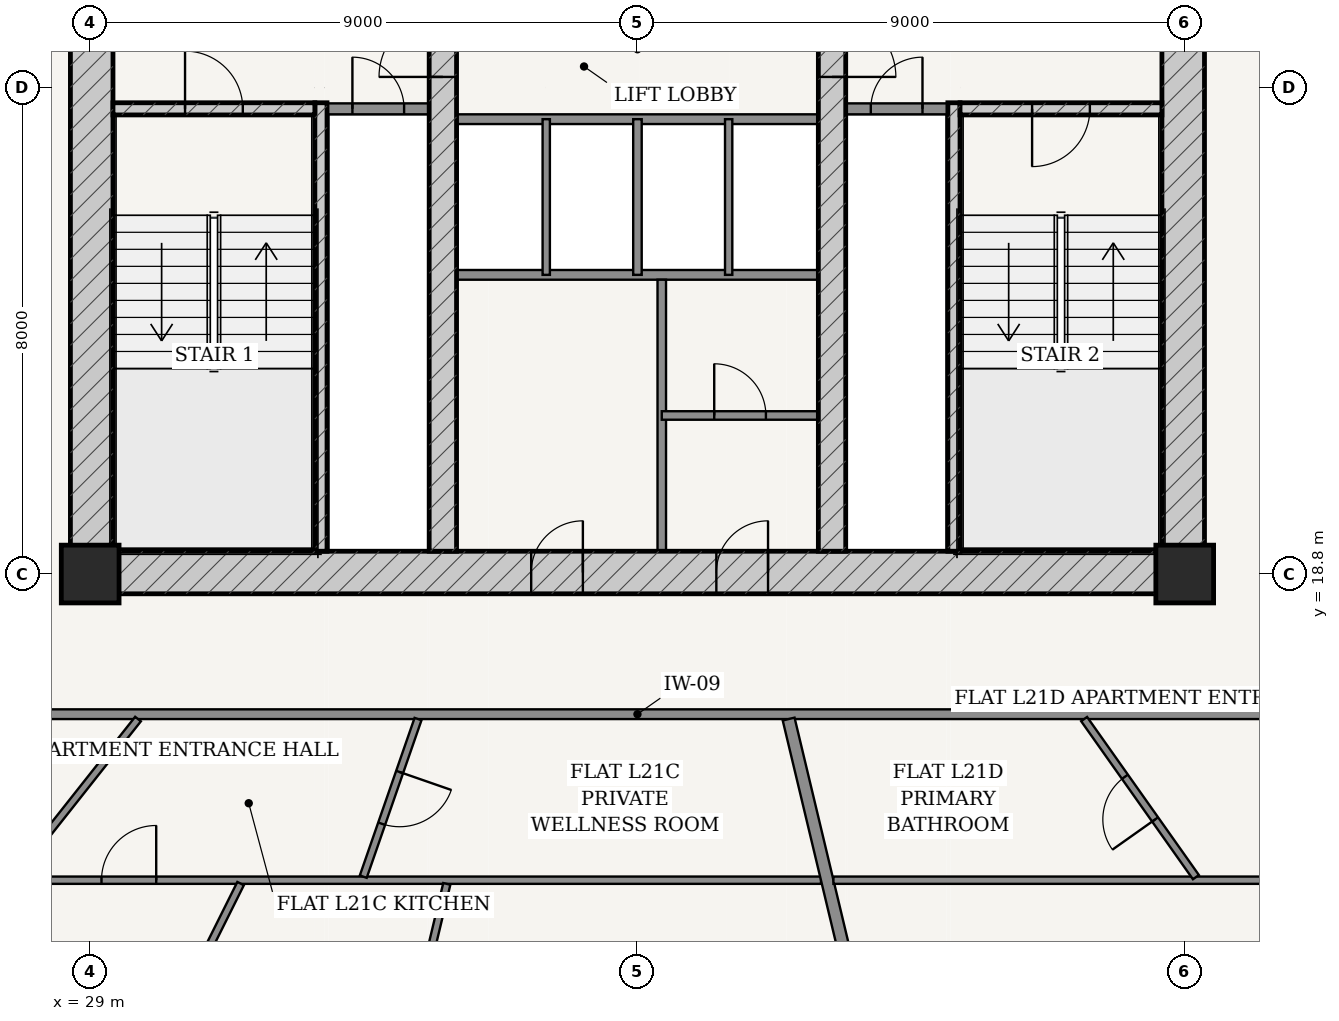
"""IFC4 building model, lengths in metres.
Left out: names, types, materials, properties, quantities, classifications, styles, units other than length and angle.
Written with IfcOpenShell. Run it as: python <this file> out.ifc"""

import sys

from ifc_helpers import new_model, si_unit, direction, frame, frame_2d, origin, origin_2d, place, context, subcontext, project, spatial, rectangle, extrude, source, transform, mapped, element, fill, save


model = new_model("IFC4")
c1 = context("Model", 3, precision=1e-05, world=origin(), true_north=direction((-0.2419218956, 0.970295726276)))
c2 = subcontext(c1, "Body", "Model", "MODEL_VIEW")
j1 = project(units=[si_unit("LENGTHUNIT", "METRE"), si_unit("PLANEANGLEUNIT", "RADIAN")], contexts=[c1])
p1 = place(None, origin())
s1 = spatial("IfcSite", under=j1, at=p1, CompositionType="ELEMENT")
p2 = place(p1, origin())
s2 = spatial("IfcBuilding", under=s1, at=p2, CompositionType="ELEMENT")
p3 = place(p2, frame((0.0, 0.0, 83.4)))
s3 = spatial("IfcBuildingStorey", under=s2, at=p3, CompositionType="ELEMENT", Elevation=83.4)
for number, where, z_axis, x_axis in (
    (1, (29.0, 18.8, 0.0), (0.0, 0.0, 1.0), (1.0, 0.0, 0.0)),
    (2, (47.0, 18.8, 0.0), (0.0, 0.0, 1.0), (1.0, 0.0, 0.0)),
):
    element("IfcColumn", number, at=place(p3, frame(where, z_axis=z_axis, x_axis=x_axis)), inside=s3, PredefinedType="COLUMN", context=c2, shape_type="SweptSolid", body=[
        extrude(rectangle(XDim=0.95, YDim=0.95, at=origin_2d()), origin(), (0.0, 0.0, 1.0), 3.6),
    ])
p4 = place(p3, frame((28.675, 18.825, 0.0), z_axis=(0.0, 0.0, 1.0), x_axis=(1.0, 0.0, 0.0)))
e3 = element("IfcWall", 3, at=p4, inside=s3, PredefinedType="SHEAR", context=c2, shape_type="SweptSolid", body=[
    extrude(rectangle(XDim=18.65, YDim=0.7, at=frame_2d((9.325, 0.0))), origin(), (0.0, 0.0, 1.0), 3.325),
])
p5 = place(p4, frame((7.577, 0.0, 0.0)))
e4 = element("IfcOpeningElement", 4, at=p5, cuts=e3, PredefinedType="OPENING", context=c2, shape_type="SweptSolid", body=[
    extrude(rectangle(XDim=0.85, YDim=2.1, at=frame_2d((0.425, 1.05))), frame((0.0, 0.36, 0.0), z_axis=(0.0, -1.0, 0.0), x_axis=(1.0, 0.0, 0.0)), (0.0, 0.0, 1.0), 0.72),
])
p6 = place(p4, frame((10.623, 0.0, 0.0)))
e5 = element("IfcOpeningElement", 5, at=p6, cuts=e3, PredefinedType="OPENING", context=c2, shape_type="SweptSolid", body=[
    extrude(rectangle(XDim=0.85, YDim=2.1, at=frame_2d((0.425, 1.05))), frame((0.0, 0.36, 0.0), z_axis=(0.0, -1.0, 0.0), x_axis=(1.0, 0.0, 0.0)), (0.0, 0.0, 1.0), 0.72),
])
p7 = place(p3, frame((29.025, 19.175, 0.0), z_axis=(0.0, 0.0, 1.0), x_axis=(0.0, 1.0, 0.0)))
e6 = element("IfcWall", 6, at=p7, inside=s3, PredefinedType="SHEAR", context=c2, shape_type="SweptSolid", body=[
    extrude(rectangle(XDim=15.25, YDim=0.7, at=frame_2d((7.625, 0.0))), origin(), (0.0, 0.0, 1.0), 3.325),
])
p8 = place(p7, frame((9.875, 0.0, 0.0)))
e7 = element("IfcOpeningElement", 7, at=p8, cuts=e6, PredefinedType="OPENING", context=c2, shape_type="SweptSolid", body=[
    extrude(rectangle(XDim=1.5, YDim=2.2, at=frame_2d((0.75, 1.1))), frame((0.0, 0.36, 0.0), z_axis=(0.0, -1.0, 0.0), x_axis=(1.0, 0.0, 0.0)), (0.0, 0.0, 1.0), 0.72),
])
p9 = place(p3, frame((46.975, 19.175, 0.0), z_axis=(0.0, 0.0, 1.0), x_axis=(0.0, 1.0, 0.0)))
e8 = element("IfcWall", 8, at=p9, inside=s3, PredefinedType="SHEAR", context=c2, shape_type="SweptSolid", body=[
    extrude(rectangle(XDim=15.25, YDim=0.7, at=frame_2d((7.625, 0.0))), origin(), (0.0, 0.0, 1.0), 3.325),
])
p10 = place(p9, frame((9.875, 0.0, 0.0)))
e9 = element("IfcOpeningElement", 9, at=p10, cuts=e8, PredefinedType="OPENING", context=c2, shape_type="SweptSolid", body=[
    extrude(rectangle(XDim=1.5, YDim=2.2, at=frame_2d((0.75, 1.1))), frame((0.0, 0.36, 0.0), z_axis=(0.0, -1.0, 0.0), x_axis=(1.0, 0.0, 0.0)), (0.0, 0.0, 1.0), 0.72),
])
p11 = place(p3, frame((32.795, 19.175, 0.0), z_axis=(0.0, 0.0, 1.0), x_axis=(0.0, 1.0, 0.0)))
e10 = element("IfcWall", 10, at=p11, inside=s3, PredefinedType="SOLIDWALL", context=c2, shape_type="SweptSolid", body=[
    extrude(rectangle(XDim=7.375, YDim=0.2, at=frame_2d((3.688, 0.0))), origin(), (0.0, 0.0, 1.0), 3.325),
])
p12 = place(p3, frame((29.375, 26.45, 0.0), z_axis=(0.0, 0.0, 1.0), x_axis=(1.0, 0.0, 0.0)))
e11 = element("IfcWall", 11, at=p12, inside=s3, PredefinedType="SOLIDWALL", context=c2, shape_type="SweptSolid", body=[
    extrude(rectangle(XDim=3.32, YDim=0.2, at=frame_2d((1.66, 0.0))), origin(), (0.0, 0.0, 1.0), 3.325),
])
p13 = place(p12, frame((1.185, 0.0, 0.0)))
e12 = element("IfcOpeningElement", 12, at=p13, cuts=e11, PredefinedType="OPENING", context=c2, shape_type="SweptSolid", body=[
    extrude(rectangle(XDim=0.95, YDim=2.15, at=frame_2d((0.475, 1.075))), frame((0.0, 0.11, 0.0), z_axis=(0.0, -1.0, 0.0), x_axis=(1.0, 0.0, 0.0)), (0.0, 0.0, 1.0), 0.22),
])
p14 = place(p3, frame((43.205, 19.175, 0.0), z_axis=(0.0, 0.0, 1.0), x_axis=(0.0, 1.0, 0.0)))
e13 = element("IfcWall", 13, at=p14, inside=s3, PredefinedType="SOLIDWALL", context=c2, shape_type="SweptSolid", body=[
    extrude(rectangle(XDim=7.375, YDim=0.2, at=frame_2d((3.688, 0.0))), origin(), (0.0, 0.0, 1.0), 3.325),
])
p15 = place(p3, frame((43.305, 26.45, 0.0), z_axis=(0.0, 0.0, 1.0), x_axis=(1.0, 0.0, 0.0)))
e14 = element("IfcWall", 14, at=p15, inside=s3, PredefinedType="SOLIDWALL", context=c2, shape_type="SweptSolid", body=[
    extrude(rectangle(XDim=3.32, YDim=0.2, at=frame_2d((1.66, 0.0))), origin(), (0.0, 0.0, 1.0), 3.325),
])
p16 = place(p15, frame((1.185, 0.0, 0.0)))
e15 = element("IfcOpeningElement", 15, at=p16, cuts=e14, PredefinedType="OPENING", context=c2, shape_type="SweptSolid", body=[
    extrude(rectangle(XDim=0.95, YDim=2.15, at=frame_2d((0.475, 1.075))), frame((0.0, 0.11, 0.0), z_axis=(0.0, -1.0, 0.0), x_axis=(1.0, 0.0, 0.0)), (0.0, 0.0, 1.0), 0.22),
])
p17 = place(p3, frame((34.8, 19.175, 0.0), z_axis=(0.0, 0.0, 1.0), x_axis=(0.0, 1.0, 0.0)))
e16 = element("IfcWall", 16, at=p17, inside=s3, PredefinedType="SHEAR", context=c2, shape_type="SweptSolid", body=[
    extrude(rectangle(XDim=15.25, YDim=0.45, at=frame_2d((7.625, 0.0))), origin(), (0.0, 0.0, 1.0), 3.325),
])
p18 = place(p17, frame((7.8, 0.0, 0.0)))
e17 = element("IfcOpeningElement", 17, at=p18, cuts=e16, PredefinedType="OPENING", context=c2, shape_type="SweptSolid", body=[
    extrude(rectangle(XDim=1.05, YDim=2.15, at=frame_2d((0.525, 1.075))), frame((0.0, 0.235, 0.0), z_axis=(0.0, -1.0, 0.0), x_axis=(1.0, 0.0, 0.0)), (0.0, 0.0, 1.0), 0.47),
])
p19 = place(p3, frame((41.2, 19.175, 0.0), z_axis=(0.0, 0.0, 1.0), x_axis=(0.0, 1.0, 0.0)))
e18 = element("IfcWall", 18, at=p19, inside=s3, PredefinedType="SHEAR", context=c2, shape_type="SweptSolid", body=[
    extrude(rectangle(XDim=15.25, YDim=0.45, at=frame_2d((7.625, 0.0))), origin(), (0.0, 0.0, 1.0), 3.325),
])
p20 = place(p19, frame((7.8, 0.0, 0.0)))
e19 = element("IfcOpeningElement", 19, at=p20, cuts=e18, PredefinedType="OPENING", context=c2, shape_type="SweptSolid", body=[
    extrude(rectangle(XDim=1.05, YDim=2.15, at=frame_2d((0.525, 1.075))), frame((0.0, 0.235, 0.0), z_axis=(0.0, -1.0, 0.0), x_axis=(1.0, 0.0, 0.0)), (0.0, 0.0, 1.0), 0.47),
])
p21 = place(p3, frame((32.9, 26.45, 0.0), z_axis=(0.0, 0.0, 1.0), x_axis=(1.0, 0.0, 0.0)))
e20 = element("IfcWall", 20, at=p21, inside=s3, PredefinedType="PARTITIONING", context=c2, shape_type="SweptSolid", body=[
    extrude(rectangle(XDim=1.675, YDim=0.18, at=frame_2d((0.837, 0.0))), origin(), (0.0, 0.0, 1.0), 3.325),
])
p22 = place(p21, frame((0.413, 0.0, 0.0)))
e21 = element("IfcOpeningElement", 21, at=p22, cuts=e20, PredefinedType="OPENING", context=c2, shape_type="SweptSolid", body=[
    extrude(rectangle(XDim=0.85, YDim=2.1, at=frame_2d((0.425, 1.05))), frame((0.0, 0.1, 0.0), z_axis=(0.0, -1.0, 0.0), x_axis=(1.0, 0.0, 0.0)), (0.0, 0.0, 1.0), 0.2),
])
p23 = place(p3, frame((41.425, 26.45, 0.0), z_axis=(0.0, 0.0, 1.0), x_axis=(1.0, 0.0, 0.0)))
e22 = element("IfcWall", 22, at=p23, inside=s3, PredefinedType="PARTITIONING", context=c2, shape_type="SweptSolid", body=[
    extrude(rectangle(XDim=1.675, YDim=0.18, at=frame_2d((0.837, 0.0))), origin(), (0.0, 0.0, 1.0), 3.325),
])
p24 = place(p23, frame((0.413, 0.0, 0.0)))
e23 = element("IfcOpeningElement", 23, at=p24, cuts=e22, PredefinedType="OPENING", context=c2, shape_type="SweptSolid", body=[
    extrude(rectangle(XDim=0.85, YDim=2.1, at=frame_2d((0.425, 1.05))), frame((0.0, 0.1, 0.0), z_axis=(0.0, -1.0, 0.0), x_axis=(1.0, 0.0, 0.0)), (0.0, 0.0, 1.0), 0.2),
])
for number, where, z_axis, x_axis in (
    (24, (35.025, 26.28, 0.0), (0.0, 0.0, 1.0), (1.0, 0.0, 0.0)),
    (25, (35.025, 23.72, 0.0), (0.0, 0.0, 1.0), (1.0, 0.0, 0.0)),
):
    element("IfcWall", number, at=place(p3, frame(where, z_axis=z_axis, x_axis=x_axis)), inside=s3, PredefinedType="PARTITIONING", context=c2, shape_type="SweptSolid", body=[
        extrude(rectangle(XDim=5.95, YDim=0.16, at=frame_2d((2.975, 0.0))), origin(), (0.0, 0.0, 1.0), 3.325),
    ])
p25 = place(p3, frame((36.5, 23.72, 0.0), z_axis=(0.0, 0.0, 1.0), x_axis=(0.0, 1.0, 0.0)))
e26 = element("IfcWall", 26, at=p25, inside=s3, PredefinedType="PARTITIONING", context=c2, shape_type="SweptSolid", body=[
    extrude(rectangle(XDim=2.56, YDim=0.12, at=frame_2d((1.28, 0.0))), origin(), (0.0, 0.0, 1.0), 3.325),
])
p26 = place(p3, frame((38.0, 23.72, 0.0), z_axis=(0.0, 0.0, 1.0), x_axis=(0.0, 1.0, 0.0)))
e27 = element("IfcWall", 27, at=p26, inside=s3, PredefinedType="PARTITIONING", context=c2, shape_type="SweptSolid", body=[
    extrude(rectangle(XDim=2.56, YDim=0.14, at=frame_2d((1.28, 0.0))), origin(), (0.0, 0.0, 1.0), 3.325),
])
p27 = place(p3, frame((39.5, 23.72, 0.0), z_axis=(0.0, 0.0, 1.0), x_axis=(0.0, 1.0, 0.0)))
e28 = element("IfcWall", 28, at=p27, inside=s3, PredefinedType="PARTITIONING", context=c2, shape_type="SweptSolid", body=[
    extrude(rectangle(XDim=2.56, YDim=0.12, at=frame_2d((1.28, 0.0))), origin(), (0.0, 0.0, 1.0), 3.325),
])
p28 = place(p3, frame((38.4, 19.175, 0.0), z_axis=(0.0, 0.0, 1.0), x_axis=(0.0, 1.0, 0.0)))
e29 = element("IfcWall", 29, at=p28, inside=s3, PredefinedType="PARTITIONING", context=c2, shape_type="SweptSolid", body=[
    extrude(rectangle(XDim=4.465, YDim=0.14, at=frame_2d((2.232, 0.0))), origin(), (0.0, 0.0, 1.0), 3.325),
])
p29 = place(p3, frame((38.4, 21.407, 0.0), z_axis=(0.0, 0.0, 1.0), x_axis=(1.0, 0.0, 0.0)))
e30 = element("IfcWall", 30, at=p29, inside=s3, PredefinedType="PARTITIONING", context=c2, shape_type="SweptSolid", body=[
    extrude(rectangle(XDim=2.575, YDim=0.14, at=frame_2d((1.288, 0.0))), origin(), (0.0, 0.0, 1.0), 3.325),
])
p30 = place(p29, frame((0.863, 0.0, 0.0)))
e31 = element("IfcOpeningElement", 31, at=p30, cuts=e30, PredefinedType="OPENING", context=c2, shape_type="SweptSolid", body=[
    extrude(rectangle(XDim=0.85, YDim=2.1, at=frame_2d((0.425, 1.05))), frame((0.0, 0.08, 0.0), z_axis=(0.0, -1.0, 0.0), x_axis=(1.0, 0.0, 0.0)), (0.0, 0.0, 1.0), 0.16),
])
p31 = place(p3, frame((26.695, 16.495, 0.0), z_axis=(0.0, 0.0, 1.0), x_axis=(1.0, 0.0, 0.0)))
e32 = element("IfcWall", 32, at=p31, inside=s3, PredefinedType="PARTITIONING", context=c2, shape_type="SweptSolid", body=[
    extrude(rectangle(XDim=22.61, YDim=0.16, at=frame_2d((11.305, 0.0))), origin(), (0.0, 0.0, 1.0), 2.767),
])
p32 = place(p3, frame((41.019, 13.765, 0.0), z_axis=(0.0, 0.0, 1.0), x_axis=(-1.0, 0.0, 0.0)))
e33 = element("IfcWall", 33, at=p32, inside=s3, PredefinedType="PARTITIONING", context=c2, shape_type="SweptSolid", body=[
    extrude(rectangle(XDim=17.054, YDim=0.12, at=frame_2d((8.527, 0.0))), origin(), (0.0, 0.0, 1.0), 2.767),
])
p33 = place(p32, frame((10.933, 0.0, 0.0)))
e34 = element("IfcOpeningElement", 34, at=p33, cuts=e33, PredefinedType="OPENING", context=c2, shape_type="SweptSolid", body=[
    extrude(rectangle(XDim=0.9, YDim=2.15, at=frame_2d((0.45, 1.075))), frame((0.0, 0.07, 0.0), z_axis=(0.0, -1.0, 0.0), x_axis=(1.0, 0.0, 0.0)), (0.0, 0.0, 1.0), 0.14),
])
p34 = place(p3, frame((31.474, 13.709, 0.0), z_axis=(0.0, 0.0, 1.0), x_axis=(-0.446179583353, -0.894943450392, 0.0)))
e35 = element("IfcWall", 35, at=p34, inside=s3, PredefinedType="PARTITIONING", context=c2, shape_type="SweptSolid", body=[
    extrude(rectangle(XDim=8.125, YDim=0.12, at=frame_2d((4.062, 0.0))), origin(), (0.0, 0.0, 1.0), 2.767),
])
p35 = place(p34, frame((3.612, 0.0, 0.0)))
e36 = element("IfcOpeningElement", 36, at=p35, cuts=e35, PredefinedType="OPENING", context=c2, shape_type="SweptSolid", body=[
    extrude(rectangle(XDim=0.9, YDim=2.15, at=frame_2d((0.45, 1.075))), frame((0.0, 0.07, 0.0), z_axis=(0.0, -1.0, 0.0), x_axis=(1.0, 0.0, 0.0)), (0.0, 0.0, 1.0), 0.14),
])
p36 = place(p3, frame((34.865, 13.705, 0.0), z_axis=(0.0, 0.0, 1.0), x_axis=(-0.23282725047, -0.97251810854, 0.0)))
e37 = element("IfcWall", 37, at=p36, inside=s3, PredefinedType="PARTITIONING", context=c2, shape_type="SweptSolid", body=[
    extrude(rectangle(XDim=8.715, YDim=0.12, at=frame_2d((4.357, 0.0))), origin(), (0.0, 0.0, 1.0), 2.767),
])
p37 = place(p36, frame((2.831, 0.0, 0.0)))
e38 = element("IfcOpeningElement", 38, at=p37, cuts=e37, PredefinedType="OPENING", context=c2, shape_type="SweptSolid", body=[
    extrude(rectangle(XDim=0.9, YDim=2.15, at=frame_2d((0.45, 1.075))), frame((0.0, 0.07, 0.0), z_axis=(0.0, -1.0, 0.0), x_axis=(1.0, 0.0, 0.0)), (0.0, 0.0, 1.0), 0.14),
])
p38 = place(p3, frame((29.787, 16.415, 0.0), z_axis=(0.0, 0.0, 1.0), x_axis=(-0.62033143471, -0.784339793145, 0.0)))
e39 = element("IfcWall", 39, at=p38, inside=s3, PredefinedType="PARTITIONING", context=c2, shape_type="SweptSolid", body=[
    extrude(rectangle(XDim=3.317, YDim=0.12, at=frame_2d((1.658, 0.0))), origin(), (0.0, 0.0, 1.0), 3.004),
])
p39 = place(p3, frame((34.392, 16.415, 0.0), z_axis=(0.0, 0.0, 1.0), x_axis=(-0.328268661855, -0.94458439837, 0.0)))
e40 = element("IfcWall", 40, at=p39, inside=s3, PredefinedType="PARTITIONING", context=c2, shape_type="SweptSolid", body=[
    extrude(rectangle(XDim=2.744, YDim=0.12, at=frame_2d((1.372, 0.0))), origin(), (0.0, 0.0, 1.0), 3.325),
])
p40 = place(p39, frame((0.922, 0.0, 0.0)))
e41 = element("IfcOpeningElement", 41, at=p40, cuts=e40, PredefinedType="OPENING", context=c2, shape_type="SweptSolid", body=[
    extrude(rectangle(XDim=0.9, YDim=2.15, at=frame_2d((0.45, 1.075))), frame((0.0, 0.07, 0.0), z_axis=(0.0, -1.0, 0.0), x_axis=(1.0, 0.0, 0.0)), (0.0, 0.0, 1.0), 0.14),
])
p41 = place(p3, frame((40.486, 16.415, 0.0), z_axis=(0.0, 0.0, 1.0), x_axis=(0.232829417917, -0.972517589636, 0.0)))
e42 = element("IfcWall", 42, at=p41, inside=s3, PredefinedType="PARTITIONING", context=c2, shape_type="SweptSolid", body=[
    extrude(rectangle(XDim=11.502, YDim=0.2, at=frame_2d((5.751, 0.0))), origin(), (0.0, 0.0, 1.0), 2.767),
])
p42 = place(p3, frame((52.035, 13.765, 0.0), z_axis=(0.0, 0.0, 1.0), x_axis=(-1.0, 0.0, 0.0)))
e43 = element("IfcWall", 43, at=p42, inside=s3, PredefinedType="PARTITIONING", context=c2, shape_type="SweptSolid", body=[
    extrude(rectangle(XDim=10.812, YDim=0.12, at=frame_2d((5.406, 0.0))), origin(), (0.0, 0.0, 1.0), 2.767),
])
p43 = place(p42, frame((2.145, 0.0, 0.0)))
e44 = element("IfcOpeningElement", 44, at=p43, cuts=e43, PredefinedType="OPENING", context=c2, shape_type="SweptSolid", body=[
    extrude(rectangle(XDim=0.9, YDim=2.15, at=frame_2d((0.45, 1.075))), frame((0.0, 0.07, 0.0), z_axis=(0.0, -1.0, 0.0), x_axis=(1.0, 0.0, 0.0)), (0.0, 0.0, 1.0), 0.14),
])
p44 = place(p3, frame((45.345, 16.415, 0.0), z_axis=(0.0, 0.0, 1.0), x_axis=(0.577474693199, -0.816408585645, 0.0)))
e45 = element("IfcWall", 45, at=p44, inside=s3, PredefinedType="PARTITIONING", context=c2, shape_type="SweptSolid", body=[
    extrude(rectangle(XDim=3.184, YDim=0.12, at=frame_2d((1.592, 0.0))), origin(), (0.0, 0.0, 1.0), 3.004),
])
p45 = place(p44, frame((1.162, 0.0, 0.0)))
e46 = element("IfcOpeningElement", 46, at=p45, cuts=e45, PredefinedType="OPENING", context=c2, shape_type="SweptSolid", body=[
    extrude(rectangle(XDim=0.86, YDim=2.15, at=frame_2d((0.43, 1.075))), frame((0.0, 0.07, 0.0), z_axis=(0.0, -1.0, 0.0), x_axis=(1.0, 0.0, 0.0)), (0.0, 0.0, 1.0), 0.14),
])
m1 = source(origin(), c2, "Body", "SweptSolid", [
    extrude(rectangle(XDim=1.05, YDim=2.15, at=frame_2d((0.525, 1.075))), frame((0.0, 0.025, 0.0), z_axis=(0.0, -1.0, 0.0), x_axis=(1.0, 0.0, 0.0)), (0.0, 0.0, 1.0), 0.05),
])
p46 = place(p18, origin())
e47 = element("IfcDoor", 47, at=p46, inside=s3, OperationType="SINGLE_SWING_LEFT", PredefinedType="DOOR", context=c2, shape_type="MappedRepresentation", body=[
    mapped(m1, transform((0.0, 0.0, 0.0), scale=1.0)),
])
fill(e17, e47)
p47 = place(p20, frame((1.05, 0.0, 0.0), z_axis=(0.0, 0.0, 1.0), x_axis=(-1.0, 0.0, 0.0)))
e48 = element("IfcDoor", 48, at=p47, inside=s3, OperationType="SINGLE_SWING_RIGHT", PredefinedType="DOOR", context=c2, shape_type="MappedRepresentation", body=[
    mapped(m1, transform((0.0, 0.0, 0.0), scale=1.0)),
])
fill(e19, e48)
m2 = source(origin(), c2, "Body", "SweptSolid", [
    extrude(rectangle(XDim=0.95, YDim=2.15, at=frame_2d((0.475, 1.075))), frame((0.0, 0.025, 0.0), z_axis=(0.0, -1.0, 0.0), x_axis=(1.0, 0.0, 0.0)), (0.0, 0.0, 1.0), 0.05),
])
p48 = place(p13, origin())
e49 = element("IfcDoor", 49, at=p48, inside=s3, OperationType="SINGLE_SWING_LEFT", PredefinedType="DOOR", context=c2, shape_type="MappedRepresentation", body=[
    mapped(m2, transform((0.0, 0.0, 0.0), scale=1.0)),
])
fill(e12, e49)
p49 = place(p16, frame((0.95, 0.0, 0.0), z_axis=(0.0, 0.0, 1.0), x_axis=(-1.0, 0.0, 0.0)))
e50 = element("IfcDoor", 50, at=p49, inside=s3, OperationType="SINGLE_SWING_RIGHT", PredefinedType="DOOR", context=c2, shape_type="MappedRepresentation", body=[
    mapped(m2, transform((0.0, 0.0, 0.0), scale=1.0)),
])
fill(e15, e50)
m3 = source(origin(), c2, "Body", "SweptSolid", [
    extrude(rectangle(XDim=0.85, YDim=2.1, at=frame_2d((0.425, 1.05))), frame((0.0, 0.025, 0.0), z_axis=(0.0, -1.0, 0.0), x_axis=(1.0, 0.0, 0.0)), (0.0, 0.0, 1.0), 0.05),
])
p50 = place(p22, origin())
e51 = element("IfcDoor", 51, at=p50, inside=s3, OperationType="SINGLE_SWING_LEFT", PredefinedType="DOOR", context=c2, shape_type="MappedRepresentation", body=[
    mapped(m3, transform((0.0, 0.0, 0.0), scale=1.0)),
])
fill(e21, e51)
p51 = place(p24, origin())
e52 = element("IfcDoor", 52, at=p51, inside=s3, OperationType="SINGLE_SWING_RIGHT", PredefinedType="DOOR", context=c2, shape_type="MappedRepresentation", body=[
    mapped(m3, transform((0.0, 0.0, 0.0), scale=1.0)),
])
fill(e23, e52)
p52 = place(p5, origin())
e53 = element("IfcDoor", 53, at=p52, inside=s3, OperationType="SINGLE_SWING_RIGHT", PredefinedType="DOOR", context=c2, shape_type="MappedRepresentation", body=[
    mapped(m3, transform((0.0, 0.0, 0.0), scale=1.0)),
])
fill(e4, e53)
p53 = place(p6, origin())
e54 = element("IfcDoor", 54, at=p53, inside=s3, OperationType="SINGLE_SWING_RIGHT", PredefinedType="DOOR", context=c2, shape_type="MappedRepresentation", body=[
    mapped(m3, transform((0.0, 0.0, 0.0), scale=1.0)),
])
fill(e5, e54)
p54 = place(p30, origin())
e55 = element("IfcDoor", 55, at=p54, inside=s3, OperationType="SINGLE_SWING_LEFT", PredefinedType="DOOR", context=c2, shape_type="MappedRepresentation", body=[
    mapped(m3, transform((0.0, 0.0, 0.0), scale=1.0)),
])
fill(e31, e55)
m4 = source(origin(), c2, "Body", "SweptSolid", [
    extrude(rectangle(XDim=0.9, YDim=2.15, at=frame_2d((0.45, 1.075))), frame((0.0, 0.025, 0.0), z_axis=(0.0, -1.0, 0.0), x_axis=(1.0, 0.0, 0.0)), (0.0, 0.0, 1.0), 0.05),
])
p55 = place(p33, frame((0.9, 0.0, 0.0), z_axis=(0.0, 0.0, 1.0), x_axis=(-1.0, 0.0, 0.0)))
e56 = element("IfcDoor", 56, at=p55, inside=s3, OperationType="SINGLE_SWING_RIGHT", PredefinedType="DOOR", context=c2, shape_type="MappedRepresentation", body=[
    mapped(m4, transform((0.0, 0.0, 0.0), scale=1.0)),
])
fill(e34, e56)
p56 = place(p40, origin())
e57 = element("IfcDoor", 57, at=p56, inside=s3, OperationType="SINGLE_SWING_LEFT", PredefinedType="DOOR", context=c2, shape_type="MappedRepresentation", body=[
    mapped(m4, transform((0.0, 0.0, 0.0), scale=1.0)),
])
fill(e41, e57)
m5 = source(origin(), c2, "Body", "SweptSolid", [
    extrude(rectangle(XDim=0.86, YDim=2.15, at=frame_2d((0.43, 1.075))), frame((0.0, 0.025, 0.0), z_axis=(0.0, -1.0, 0.0), x_axis=(1.0, 0.0, 0.0)), (0.0, 0.0, 1.0), 0.05),
])
p57 = place(p45, frame((0.86, 0.0, 0.0), z_axis=(0.0, 0.0, 1.0), x_axis=(-1.0, 0.0, 0.0)))
e58 = element("IfcDoor", 58, at=p57, inside=s3, OperationType="SINGLE_SWING_LEFT", PredefinedType="DOOR", context=c2, shape_type="MappedRepresentation", body=[
    mapped(m5, transform((0.0, 0.0, 0.0), scale=1.0)),
])
fill(e46, e58)
save(model, sys.argv[1])
